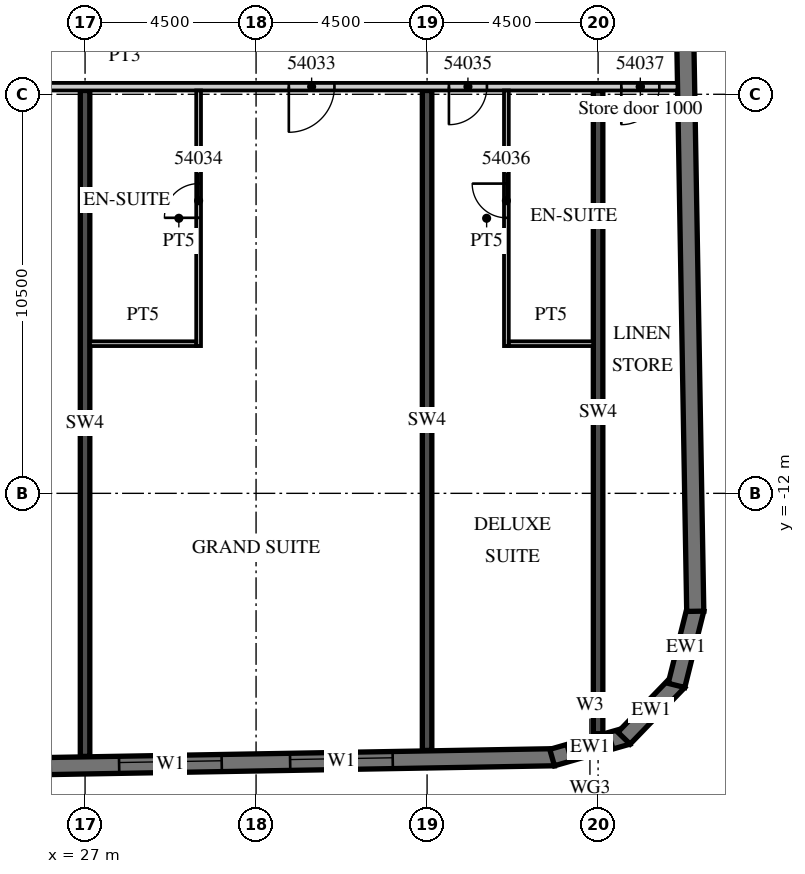
"""IFC4 building model, lengths in metres.
Left out: names, types, materials, properties, quantities, classifications, styles, units other than length and angle.
Written with IfcOpenShell. Run it as: python <this file> out.ifc"""

import sys

from ifc_helpers import new_model, si_unit, direction, frame, frame_2d, origin, place, context, subcontext, project, spatial, polyline, rectangle, outline, extrude, element, fill, save


model = new_model("IFC4")
c1 = context("Model", 3, precision=1e-05, world=origin(), true_north=direction((0.0, 1.0)))
c2 = subcontext(c1, "Body", "Model", "MODEL_VIEW")
j1 = project(units=[si_unit("LENGTHUNIT", "METRE"), si_unit("PLANEANGLEUNIT", "RADIAN")], contexts=[c1])
p1 = place(None, origin())
s1 = spatial("IfcSite", under=j1, at=p1, CompositionType="ELEMENT")
p2 = place(p1, origin())
s2 = spatial("IfcBuilding", under=s1, at=p2, CompositionType="ELEMENT")
p3 = place(p2, frame((0.0, 0.0, 224.3)))
s3 = spatial("IfcBuildingStorey", under=s2, at=p3, CompositionType="ELEMENT", Elevation=224.3)
p4 = place(p3, frame((27.0, -18.922, 0.0), z_axis=(0.0, 0.0, 1.0), x_axis=(0.0, 1.0, 0.0)))
e1 = element("IfcWall", 1, at=p4, inside=s3, PredefinedType="SHEAR", context=c2, shape_type="SweptSolid", body=[
    extrude(rectangle(XDim=17.522, YDim=0.25, at=frame_2d((8.761, 0.0))), origin(), (0.0, 0.0, 1.0), 3.3),
])
p5 = place(p3, frame((36.0, -18.765, 0.0), z_axis=(0.0, 0.0, 1.0), x_axis=(0.0, 1.0, 0.0)))
e2 = element("IfcWall", 2, at=p5, inside=s3, PredefinedType="SHEAR", context=c2, shape_type="SweptSolid", body=[
    extrude(rectangle(XDim=17.365, YDim=0.25, at=frame_2d((8.683, 0.0))), origin(), (0.0, 0.0, 1.0), 3.3),
])
p6 = place(p3, frame((40.5, -18.325, 0.0), z_axis=(0.0, 0.0, 1.0), x_axis=(0.0, 1.0, 0.0)))
e3 = element("IfcWall", 3, at=p6, inside=s3, PredefinedType="SHEAR", context=c2, shape_type="SweptSolid", body=[
    extrude(rectangle(XDim=16.925, YDim=0.25, at=frame_2d((8.463, 0.0))), origin(), (0.0, 0.0, 1.0), 3.3),
])
p7 = place(p3, frame((-13.504, -19.866, 0.0), z_axis=(0.0, 0.0, 1.0), x_axis=(0.999847672978, 0.017453676992, 0.0)))
e4 = element("IfcWall", 4, at=p7, inside=s3, PredefinedType="SOLIDWALL", context=c2, shape_type="SweptSolid", body=[
    extrude(rectangle(XDim=52.86, YDim=0.45, at=frame_2d((26.43, 0.0))), origin(), (0.0, 0.0, 1.0), 3.02),
])
p8 = place(p7, frame((0.9, 0.0, 0.45)))
e5 = element("IfcOpeningElement", 5, at=p8, cuts=e4, PredefinedType="OPENING", context=c2, shape_type="SweptSolid", body=[
    extrude(rectangle(XDim=2.7, YDim=2.25, at=frame_2d((1.35, 1.125))), frame((0.0, 0.235, 0.0), z_axis=(0.0, -1.0, 0.0), x_axis=(1.0, 0.0, 0.0)), (0.0, 0.0, 1.0), 0.47),
])
p9 = place(p7, frame((5.401, 0.0, 0.45)))
e6 = element("IfcOpeningElement", 6, at=p9, cuts=e4, PredefinedType="OPENING", context=c2, shape_type="SweptSolid", body=[
    extrude(rectangle(XDim=2.7, YDim=2.25, at=frame_2d((1.35, 1.125))), frame((0.0, 0.235, 0.0), z_axis=(0.0, -1.0, 0.0), x_axis=(1.0, 0.0, 0.0)), (0.0, 0.0, 1.0), 0.47),
])
p10 = place(p7, frame((9.902, 0.0, 0.45)))
e7 = element("IfcOpeningElement", 7, at=p10, cuts=e4, PredefinedType="OPENING", context=c2, shape_type="SweptSolid", body=[
    extrude(rectangle(XDim=2.7, YDim=2.25, at=frame_2d((1.35, 1.125))), frame((0.0, 0.235, 0.0), z_axis=(0.0, -1.0, 0.0), x_axis=(1.0, 0.0, 0.0)), (0.0, 0.0, 1.0), 0.47),
])
p11 = place(p7, frame((14.402, 0.0, 0.45)))
e8 = element("IfcOpeningElement", 8, at=p11, cuts=e4, PredefinedType="OPENING", context=c2, shape_type="SweptSolid", body=[
    extrude(rectangle(XDim=2.7, YDim=2.25, at=frame_2d((1.35, 1.125))), frame((0.0, 0.235, 0.0), z_axis=(0.0, -1.0, 0.0), x_axis=(1.0, 0.0, 0.0)), (0.0, 0.0, 1.0), 0.47),
])
p12 = place(p7, frame((18.903, 0.0, 0.45)))
e9 = element("IfcOpeningElement", 9, at=p12, cuts=e4, PredefinedType="OPENING", context=c2, shape_type="SweptSolid", body=[
    extrude(rectangle(XDim=2.7, YDim=2.25, at=frame_2d((1.35, 1.125))), frame((0.0, 0.235, 0.0), z_axis=(0.0, -1.0, 0.0), x_axis=(1.0, 0.0, 0.0)), (0.0, 0.0, 1.0), 0.47),
])
p13 = place(p7, frame((23.404, 0.0, 0.45)))
e10 = element("IfcOpeningElement", 10, at=p13, cuts=e4, PredefinedType="OPENING", context=c2, shape_type="SweptSolid", body=[
    extrude(rectangle(XDim=2.7, YDim=2.25, at=frame_2d((1.35, 1.125))), frame((0.0, 0.235, 0.0), z_axis=(0.0, -1.0, 0.0), x_axis=(1.0, 0.0, 0.0)), (0.0, 0.0, 1.0), 0.47),
])
p14 = place(p7, frame((27.904, 0.0, 0.45)))
e11 = element("IfcOpeningElement", 11, at=p14, cuts=e4, PredefinedType="OPENING", context=c2, shape_type="SweptSolid", body=[
    extrude(rectangle(XDim=2.7, YDim=2.25, at=frame_2d((1.35, 1.125))), frame((0.0, 0.235, 0.0), z_axis=(0.0, -1.0, 0.0), x_axis=(1.0, 0.0, 0.0)), (0.0, 0.0, 1.0), 0.47),
])
p15 = place(p7, frame((32.405, 0.0, 0.45)))
e12 = element("IfcOpeningElement", 12, at=p15, cuts=e4, PredefinedType="OPENING", context=c2, shape_type="SweptSolid", body=[
    extrude(rectangle(XDim=2.7, YDim=2.25, at=frame_2d((1.35, 1.125))), frame((0.0, 0.235, 0.0), z_axis=(0.0, -1.0, 0.0), x_axis=(1.0, 0.0, 0.0)), (0.0, 0.0, 1.0), 0.47),
])
p16 = place(p7, frame((36.906, 0.0, 0.45)))
e13 = element("IfcOpeningElement", 13, at=p16, cuts=e4, PredefinedType="OPENING", context=c2, shape_type="SweptSolid", body=[
    extrude(rectangle(XDim=2.7, YDim=2.25, at=frame_2d((1.35, 1.125))), frame((0.0, 0.235, 0.0), z_axis=(0.0, -1.0, 0.0), x_axis=(1.0, 0.0, 0.0)), (0.0, 0.0, 1.0), 0.47),
])
p17 = place(p7, frame((41.406, 0.0, 0.45)))
e14 = element("IfcOpeningElement", 14, at=p17, cuts=e4, PredefinedType="OPENING", context=c2, shape_type="SweptSolid", body=[
    extrude(rectangle(XDim=2.7, YDim=2.25, at=frame_2d((1.35, 1.125))), frame((0.0, 0.235, 0.0), z_axis=(0.0, -1.0, 0.0), x_axis=(1.0, 0.0, 0.0)), (0.0, 0.0, 1.0), 0.47),
])
p18 = place(p7, frame((45.907, 0.0, 0.45)))
e15 = element("IfcOpeningElement", 15, at=p18, cuts=e4, PredefinedType="OPENING", context=c2, shape_type="SweptSolid", body=[
    extrude(rectangle(XDim=2.7, YDim=2.25, at=frame_2d((1.35, 1.125))), frame((0.0, 0.235, 0.0), z_axis=(0.0, -1.0, 0.0), x_axis=(1.0, 0.0, 0.0)), (0.0, 0.0, 1.0), 0.47),
])
p19 = place(p3, frame((39.29, -18.952, 0.0), z_axis=(0.0, 0.0, 1.0), x_axis=(0.961247584925, 0.275686562016, 0.0)))
e16 = element("IfcWall", 16, at=p19, inside=s3, PredefinedType="SOLIDWALL", context=c2, shape_type="SweptSolid", body=[
    extrude(outline(polyline([(0.0, -0.225), (2.071, -0.225), (1.95, 0.225), (0.121, 0.225), (0.0, -0.225)])), origin(), (0.0, 0.0, 1.0), 3.02),
])
p20 = place(p19, frame((0.435, 0.0, 0.45)))
e17 = element("IfcOpeningElement", 17, at=p20, cuts=e16, PredefinedType="OPENING", context=c2, shape_type="SweptSolid", body=[
    extrude(rectangle(XDim=1.2, YDim=2.25, at=frame_2d((0.6, 1.125))), frame((0.0, 0.235, 0.0), z_axis=(0.0, -1.0, 0.0), x_axis=(1.0, 0.0, 0.0)), (0.0, 0.0, 1.0), 0.47),
])
p21 = place(p3, frame((41.181, -18.442, 0.0), z_axis=(0.0, 0.0, 1.0), x_axis=(0.694678672846, 0.719320193998, 0.0)))
e18 = element("IfcWall", 18, at=p21, inside=s3, PredefinedType="SOLIDWALL", context=c2, shape_type="SweptSolid", body=[
    extrude(outline(polyline([(0.0, -0.225), (2.071, -0.225), (1.95, 0.225), (0.121, 0.225), (0.0, -0.225)])), origin(), (0.0, 0.0, 1.0), 3.02),
])
p22 = place(p3, frame((42.563, -17.054, 0.0), z_axis=(0.0, 0.0, 1.0), x_axis=(0.241841950319, 0.970315655375, 0.0)))
e19 = element("IfcWall", 19, at=p22, inside=s3, PredefinedType="SOLIDWALL", context=c2, shape_type="SweptSolid", body=[
    extrude(outline(polyline([(0.0, -0.225), (2.071, -0.225), (1.95, 0.225), (0.121, 0.225), (0.0, -0.225)])), origin(), (0.0, 0.0, 1.0), 3.02),
])
p23 = place(p3, frame((43.057, -15.103, 0.0), z_axis=(0.0, 0.0, 1.0), x_axis=(-0.017452408953, 0.999847695112, 0.0)))
e20 = element("IfcWall", 20, at=p23, inside=s3, PredefinedType="SOLIDWALL", context=c2, shape_type="SweptSolid", body=[
    extrude(rectangle(XDim=33.0, YDim=0.45, at=frame_2d((16.5, 0.0))), origin(), (0.0, 0.0, 1.0), 3.02),
])
p24 = place(p3, frame((13.5, -1.3, 0.0), z_axis=(0.0, 0.0, 1.0), x_axis=(1.0, 0.0, 0.0)))
e21 = element("IfcWall", 21, at=p24, inside=s3, PredefinedType="PARTITIONING", context=c2, shape_type="SweptSolid", body=[
    extrude(rectangle(XDim=29.091, YDim=0.2, at=frame_2d((14.545, 0.0))), origin(), (0.0, 0.0, 1.0), 3.02),
])
p25 = place(p24, frame((0.575, 0.0, 0.0)))
e22 = element("IfcOpeningElement", 22, at=p25, cuts=e21, PredefinedType="OPENING", context=c2, shape_type="SweptSolid", body=[
    extrude(rectangle(XDim=1.0, YDim=2.1, at=frame_2d((0.5, 1.05))), frame((0.0, 0.11, 0.0), z_axis=(0.0, -1.0, 0.0), x_axis=(1.0, 0.0, 0.0)), (0.0, 0.0, 1.0), 0.22),
])
p26 = place(p24, frame((9.862, 0.0, 0.0)))
e23 = element("IfcOpeningElement", 23, at=p26, cuts=e21, PredefinedType="OPENING", context=c2, shape_type="SweptSolid", body=[
    extrude(rectangle(XDim=1.2, YDim=2.1, at=frame_2d((0.6, 1.05))), frame((0.0, 0.11, 0.0), z_axis=(0.0, -1.0, 0.0), x_axis=(1.0, 0.0, 0.0)), (0.0, 0.0, 1.0), 0.22),
])
p27 = place(p24, frame((18.862, 0.0, 0.0)))
e24 = element("IfcOpeningElement", 24, at=p27, cuts=e21, PredefinedType="OPENING", context=c2, shape_type="SweptSolid", body=[
    extrude(rectangle(XDim=1.2, YDim=2.1, at=frame_2d((0.6, 1.05))), frame((0.0, 0.11, 0.0), z_axis=(0.0, -1.0, 0.0), x_axis=(1.0, 0.0, 0.0)), (0.0, 0.0, 1.0), 0.22),
])
p28 = place(p24, frame((23.075, 0.0, 0.0)))
e25 = element("IfcOpeningElement", 25, at=p28, cuts=e21, PredefinedType="OPENING", context=c2, shape_type="SweptSolid", body=[
    extrude(rectangle(XDim=1.0, YDim=2.1, at=frame_2d((0.5, 1.05))), frame((0.0, 0.11, 0.0), z_axis=(0.0, -1.0, 0.0), x_axis=(1.0, 0.0, 0.0)), (0.0, 0.0, 1.0), 0.22),
])
p29 = place(p24, frame((27.611, 0.0, 0.0)))
e26 = element("IfcOpeningElement", 26, at=p29, cuts=e21, PredefinedType="OPENING", context=c2, shape_type="SweptSolid", body=[
    extrude(rectangle(XDim=1.0, YDim=2.4, at=frame_2d((0.5, 1.2))), frame((0.0, 0.11, 0.0), z_axis=(0.0, -1.0, 0.0), x_axis=(1.0, 0.0, 0.0)), (0.0, 0.0, 1.0), 0.22),
])
p30 = place(p3, frame((29.988, -8.125, 0.0), z_axis=(0.0, 0.0, 1.0), x_axis=(0.0, 1.0, 0.0)))
e27 = element("IfcWall", 27, at=p30, inside=s3, PredefinedType="PARTITIONING", context=c2, shape_type="SweptSolid", body=[
    extrude(rectangle(XDim=6.725, YDim=0.125, at=frame_2d((3.363, 0.0))), origin(), (0.0, 0.0, 1.0), 3.02),
])
p31 = place(p30, frame((3.375, 0.0, 0.0)))
e28 = element("IfcOpeningElement", 28, at=p31, cuts=e27, PredefinedType="OPENING", context=c2, shape_type="SweptSolid", body=[
    extrude(rectangle(XDim=0.9, YDim=2.1, at=frame_2d((0.45, 1.05))), frame((0.0, 0.073, 0.0), z_axis=(0.0, -1.0, 0.0), x_axis=(1.0, 0.0, 0.0)), (0.0, 0.0, 1.0), 0.145),
])
p32 = place(p3, frame((27.125, -8.062, 0.0), z_axis=(0.0, 0.0, 1.0), x_axis=(1.0, 0.0, 0.0)))
e29 = element("IfcWall", 29, at=p32, inside=s3, PredefinedType="PARTITIONING", context=c2, shape_type="SweptSolid", body=[
    extrude(rectangle(XDim=2.8, YDim=0.125, at=frame_2d((1.4, 0.0))), origin(), (0.0, 0.0, 1.0), 3.02),
])
p33 = place(p3, frame((38.087, -8.125, 0.0), z_axis=(0.0, 0.0, 1.0), x_axis=(0.0, 1.0, 0.0)))
e30 = element("IfcWall", 30, at=p33, inside=s3, PredefinedType="PARTITIONING", context=c2, shape_type="SweptSolid", body=[
    extrude(rectangle(XDim=6.725, YDim=0.125, at=frame_2d((3.363, 0.0))), origin(), (0.0, 0.0, 1.0), 3.02),
])
p34 = place(p33, frame((3.375, 0.0, 0.0)))
e31 = element("IfcOpeningElement", 31, at=p34, cuts=e30, PredefinedType="OPENING", context=c2, shape_type="SweptSolid", body=[
    extrude(rectangle(XDim=0.9, YDim=2.1, at=frame_2d((0.45, 1.05))), frame((0.0, 0.073, 0.0), z_axis=(0.0, -1.0, 0.0), x_axis=(1.0, 0.0, 0.0)), (0.0, 0.0, 1.0), 0.145),
])
p35 = place(p3, frame((38.15, -8.062, 0.0), z_axis=(0.0, 0.0, 1.0), x_axis=(1.0, 0.0, 0.0)))
e32 = element("IfcWall", 32, at=p35, inside=s3, PredefinedType="PARTITIONING", context=c2, shape_type="SweptSolid", body=[
    extrude(rectangle(XDim=2.225, YDim=0.125, at=frame_2d((1.113, 0.0))), origin(), (0.0, 0.0, 1.0), 3.02),
])
p36 = place(p17, origin())
e33 = element("IfcWindow", 33, at=p36, inside=s3, PartitioningType="SINGLE_PANEL", PredefinedType="WINDOW", context=c2, shape_type="SweptSolid", body=[
    extrude(rectangle(XDim=2.7, YDim=2.25, at=frame_2d((1.35, 1.125))), frame((0.0, 0.09, 0.0), z_axis=(0.0, -1.0, 0.0), x_axis=(1.0, 0.0, 0.0)), (0.0, 0.0, 1.0), 0.06),
])
fill(e14, e33)
p37 = place(p18, origin())
e34 = element("IfcWindow", 34, at=p37, inside=s3, PartitioningType="SINGLE_PANEL", PredefinedType="WINDOW", context=c2, shape_type="SweptSolid", body=[
    extrude(rectangle(XDim=2.7, YDim=2.25, at=frame_2d((1.35, 1.125))), frame((0.0, 0.09, 0.0), z_axis=(0.0, -1.0, 0.0), x_axis=(1.0, 0.0, 0.0)), (0.0, 0.0, 1.0), 0.06),
])
fill(e15, e34)
p38 = place(p20, origin())
e35 = element("IfcWindow", 35, at=p38, inside=s3, PartitioningType="SINGLE_PANEL", PredefinedType="WINDOW", context=c2, shape_type="SweptSolid", body=[
    extrude(rectangle(XDim=1.2, YDim=2.25, at=frame_2d((0.6, 1.125))), frame((0.0, 0.09, 0.0), z_axis=(0.0, -1.0, 0.0), x_axis=(1.0, 0.0, 0.0)), (0.0, 0.0, 1.0), 0.06),
])
fill(e17, e35)
p39 = place(p27, origin())
e36 = element("IfcDoor", 36, at=p39, inside=s3, OperationType="SINGLE_SWING_LEFT", PredefinedType="DOOR", context=c2, shape_type="SweptSolid", body=[
    extrude(rectangle(XDim=1.2, YDim=2.1, at=frame_2d((0.6, 1.05))), frame((0.0, 0.025, 0.0), z_axis=(0.0, -1.0, 0.0), x_axis=(1.0, 0.0, 0.0)), (0.0, 0.0, 1.0), 0.05),
])
fill(e24, e36)
p40 = place(p31, origin())
e37 = element("IfcDoor", 37, at=p40, inside=s3, OperationType="SINGLE_SWING_LEFT", PredefinedType="DOOR", context=c2, shape_type="SweptSolid", body=[
    extrude(rectangle(XDim=0.9, YDim=2.1, at=frame_2d((0.45, 1.05))), frame((0.0, 0.025, 0.0), z_axis=(0.0, -1.0, 0.0), x_axis=(1.0, 0.0, 0.0)), (0.0, 0.0, 1.0), 0.05),
])
fill(e28, e37)
p41 = place(p28, origin())
e38 = element("IfcDoor", 38, at=p41, inside=s3, OperationType="SINGLE_SWING_LEFT", PredefinedType="DOOR", context=c2, shape_type="SweptSolid", body=[
    extrude(rectangle(XDim=1.0, YDim=2.1, at=frame_2d((0.5, 1.05))), frame((0.0, 0.025, 0.0), z_axis=(0.0, -1.0, 0.0), x_axis=(1.0, 0.0, 0.0)), (0.0, 0.0, 1.0), 0.05),
])
fill(e25, e38)
p42 = place(p34, origin())
e39 = element("IfcDoor", 39, at=p42, inside=s3, OperationType="SINGLE_SWING_RIGHT", PredefinedType="DOOR", context=c2, shape_type="SweptSolid", body=[
    extrude(rectangle(XDim=0.9, YDim=2.1, at=frame_2d((0.45, 1.05))), frame((0.0, 0.025, 0.0), z_axis=(0.0, -1.0, 0.0), x_axis=(1.0, 0.0, 0.0)), (0.0, 0.0, 1.0), 0.05),
])
fill(e31, e39)
p43 = place(p29, origin())
e40 = element("IfcDoor", 40, at=p43, inside=s3, OperationType="SINGLE_SWING_LEFT", PredefinedType="DOOR", context=c2, shape_type="SweptSolid", body=[
    extrude(rectangle(XDim=1.0, YDim=2.4, at=frame_2d((0.5, 1.2))), frame((0.0, 0.025, 0.0), z_axis=(0.0, -1.0, 0.0), x_axis=(1.0, 0.0, 0.0)), (0.0, 0.0, 1.0), 0.05),
])
fill(e26, e40)
save(model, sys.argv[1])
